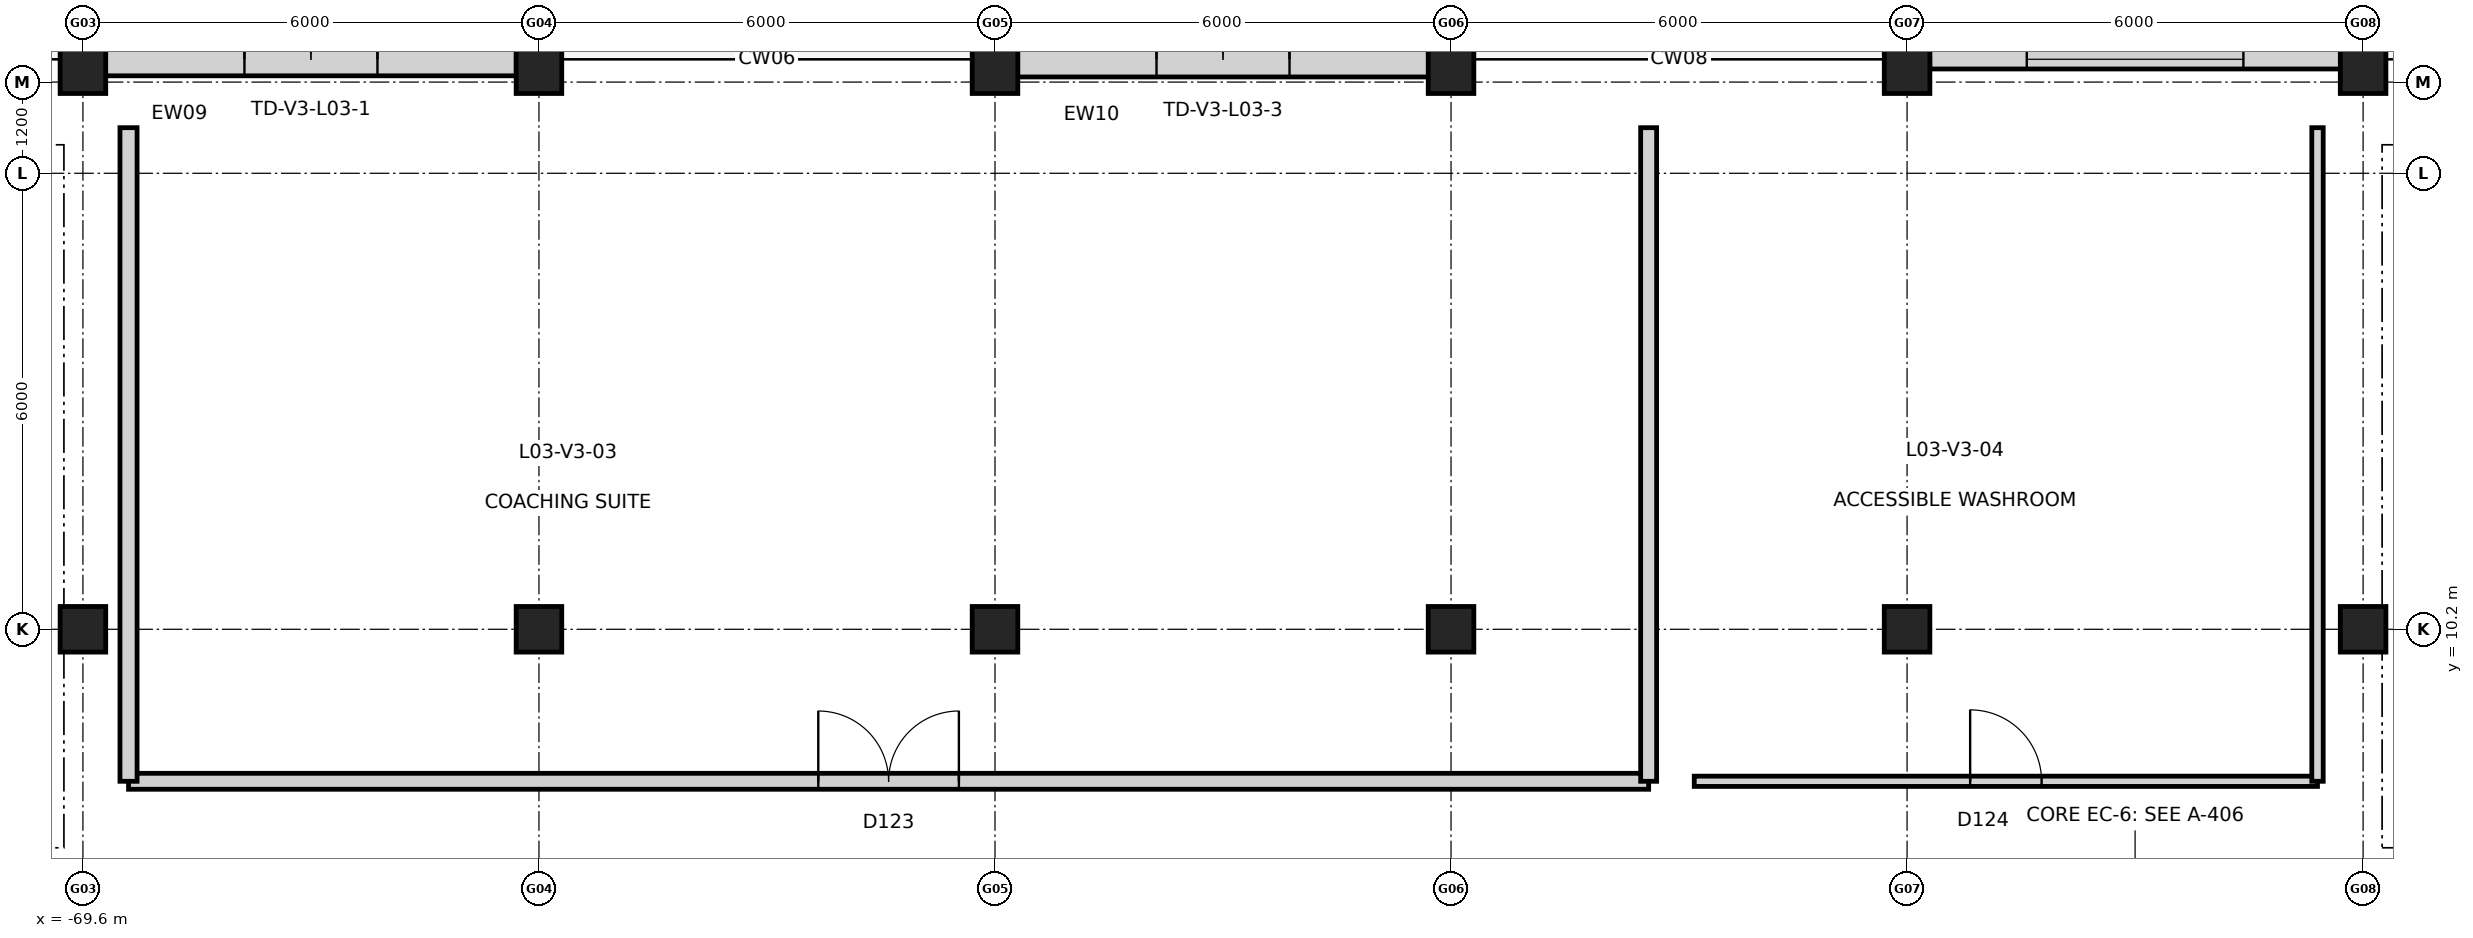
"""IFC4 building model, lengths in metres.
Left out: names, types, materials, properties, quantities, classifications, styles, units other than length and angle.
Written with IfcOpenShell. Run it as: python <this file> out.ifc"""

import sys

from ifc_helpers import new_model, si_unit, direction, frame, frame_2d, origin, origin_2d, place, context, subcontext, project, spatial, rectangle, extrude, element, fill, save


model = new_model("IFC4")
c1 = context("Model", 3, precision=1e-05, world=origin(), true_north=direction((0.0, 1.0)))
c2 = subcontext(c1, "Body", "Model", "MODEL_VIEW")
j1 = project(units=[si_unit("LENGTHUNIT", "METRE"), si_unit("PLANEANGLEUNIT", "RADIAN")], contexts=[c1])
p1 = place(None, origin())
s1 = spatial("IfcSite", under=j1, at=p1, CompositionType="ELEMENT")
p2 = place(p1, origin())
s2 = spatial("IfcBuilding", under=s1, at=p2, CompositionType="ELEMENT")
p3 = place(p2, frame((0.0, 0.0, 15.0)))
s3 = spatial("IfcBuildingStorey", under=s2, at=p3, CompositionType="ELEMENT", Elevation=15.0)
p4 = place(p3, frame((-69.6, 10.2, 0.0), z_axis=(0.0, 0.0, 1.0), x_axis=(1.0, 0.0, 0.0)))
e1 = element("IfcColumn", 1, at=p4, inside=s3, PredefinedType="COLUMN", context=c2, shape_type="SweptSolid", body=[
    extrude(rectangle(XDim=0.6, YDim=0.6, at=origin_2d()), origin(), (0.0, 0.0, 1.0), 4.8),
])
p5 = place(p3, frame((-69.6, 17.7, 0.0), z_axis=(0.0, 0.0, 1.0), x_axis=(1.0, 0.0, 0.0)))
e2 = element("IfcColumn", 2, at=p5, inside=s3, PredefinedType="COLUMN", context=c2, shape_type="SweptSolid", body=[
    extrude(rectangle(XDim=0.6, YDim=0.9, at=origin_2d()), origin(), (0.0, 0.0, 1.0), 4.8),
])
p6 = place(p3, frame((-63.6, 10.2, 0.0), z_axis=(0.0, 0.0, 1.0), x_axis=(1.0, 0.0, 0.0)))
e3 = element("IfcColumn", 3, at=p6, inside=s3, PredefinedType="COLUMN", context=c2, shape_type="SweptSolid", body=[
    extrude(rectangle(XDim=0.6, YDim=0.6, at=origin_2d()), origin(), (0.0, 0.0, 1.0), 4.8),
])
p7 = place(p3, frame((-63.6, 17.7, 0.0), z_axis=(0.0, 0.0, 1.0), x_axis=(1.0, 0.0, 0.0)))
e4 = element("IfcColumn", 4, at=p7, inside=s3, PredefinedType="COLUMN", context=c2, shape_type="SweptSolid", body=[
    extrude(rectangle(XDim=0.6, YDim=0.9, at=origin_2d()), origin(), (0.0, 0.0, 1.0), 4.8),
])
p8 = place(p3, frame((-57.6, 10.2, 0.0), z_axis=(0.0, 0.0, 1.0), x_axis=(1.0, 0.0, 0.0)))
e5 = element("IfcColumn", 5, at=p8, inside=s3, PredefinedType="COLUMN", context=c2, shape_type="SweptSolid", body=[
    extrude(rectangle(XDim=0.6, YDim=0.6, at=origin_2d()), origin(), (0.0, 0.0, 1.0), 4.8),
])
p9 = place(p3, frame((-57.6, 17.7, 0.0), z_axis=(0.0, 0.0, 1.0), x_axis=(1.0, 0.0, 0.0)))
e6 = element("IfcColumn", 6, at=p9, inside=s3, PredefinedType="COLUMN", context=c2, shape_type="SweptSolid", body=[
    extrude(rectangle(XDim=0.6, YDim=0.9, at=origin_2d()), origin(), (0.0, 0.0, 1.0), 4.8),
])
p10 = place(p3, frame((-51.6, 10.2, 0.0), z_axis=(0.0, 0.0, 1.0), x_axis=(1.0, 0.0, 0.0)))
e7 = element("IfcColumn", 7, at=p10, inside=s3, PredefinedType="COLUMN", context=c2, shape_type="SweptSolid", body=[
    extrude(rectangle(XDim=0.6, YDim=0.6, at=origin_2d()), origin(), (0.0, 0.0, 1.0), 4.8),
])
p11 = place(p3, frame((-51.6, 17.7, 0.0), z_axis=(0.0, 0.0, 1.0), x_axis=(1.0, 0.0, 0.0)))
e8 = element("IfcColumn", 8, at=p11, inside=s3, PredefinedType="COLUMN", context=c2, shape_type="SweptSolid", body=[
    extrude(rectangle(XDim=0.6, YDim=0.9, at=origin_2d()), origin(), (0.0, 0.0, 1.0), 4.8),
])
p12 = place(p3, frame((-45.6, 10.2, 0.0), z_axis=(0.0, 0.0, 1.0), x_axis=(1.0, 0.0, 0.0)))
e9 = element("IfcColumn", 9, at=p12, inside=s3, PredefinedType="COLUMN", context=c2, shape_type="SweptSolid", body=[
    extrude(rectangle(XDim=0.6, YDim=0.6, at=origin_2d()), origin(), (0.0, 0.0, 1.0), 4.8),
])
p13 = place(p3, frame((-45.6, 17.7, 0.0), z_axis=(0.0, 0.0, 1.0), x_axis=(1.0, 0.0, 0.0)))
e10 = element("IfcColumn", 10, at=p13, inside=s3, PredefinedType="COLUMN", context=c2, shape_type="SweptSolid", body=[
    extrude(rectangle(XDim=0.6, YDim=0.9, at=origin_2d()), origin(), (0.0, 0.0, 1.0), 4.8),
])
p14 = place(p3, frame((-39.6, 10.2, 0.0), z_axis=(0.0, 0.0, 1.0), x_axis=(1.0, 0.0, 0.0)))
e11 = element("IfcColumn", 11, at=p14, inside=s3, PredefinedType="COLUMN", context=c2, shape_type="SweptSolid", body=[
    extrude(rectangle(XDim=0.6, YDim=0.6, at=origin_2d()), origin(), (0.0, 0.0, 1.0), 4.8),
])
p15 = place(p3, frame((-39.6, 17.7, 0.0), z_axis=(0.0, 0.0, 1.0), x_axis=(1.0, 0.0, 0.0)))
e12 = element("IfcColumn", 12, at=p15, inside=s3, PredefinedType="COLUMN", context=c2, shape_type="SweptSolid", body=[
    extrude(rectangle(XDim=0.6, YDim=0.9, at=origin_2d()), origin(), (0.0, 0.0, 1.0), 4.8),
])
p16 = place(p3, frame((-69.302, 17.7, 0.0), z_axis=(0.0, 0.0, 1.0), x_axis=(1.0, 0.0, 0.0)))
e13 = element("IfcWall", 13, at=p16, inside=s3, PredefinedType="STANDARD", context=c2, shape_type="SweptSolid", body=[
    extrude(rectangle(XDim=5.404, YDim=0.435, at=frame_2d((2.702, 0.0))), origin(), (0.0, 0.0, 1.0), 3.745),
])
p17 = place(p16, frame((1.827, 0.0, 0.0)))
e14 = element("IfcOpeningElement", 14, at=p17, cuts=e13, PredefinedType="OPENING", context=c2, shape_type="SweptSolid", body=[
    extrude(rectangle(XDim=1.75, YDim=2.3, at=frame_2d((0.875, 1.15))), frame((0.0, 0.228, 0.0), z_axis=(0.0, -1.0, 0.0), x_axis=(1.0, 0.0, 0.0)), (0.0, 0.0, 1.0), 0.455),
])
p18 = place(p3, frame((-57.302, 17.7, 0.0), z_axis=(0.0, 0.0, 1.0), x_axis=(1.0, 0.0, 0.0)))
e15 = element("IfcWall", 15, at=p18, inside=s3, PredefinedType="STANDARD", context=c2, shape_type="SweptSolid", body=[
    extrude(rectangle(XDim=5.404, YDim=0.465, at=frame_2d((2.702, 0.0))), origin(), (0.0, 0.0, 1.0), 3.745),
])
p19 = place(p18, frame((1.827, 0.0, 0.0)))
e16 = element("IfcOpeningElement", 16, at=p19, cuts=e15, PredefinedType="OPENING", context=c2, shape_type="SweptSolid", body=[
    extrude(rectangle(XDim=1.75, YDim=2.3, at=frame_2d((0.875, 1.15))), frame((0.0, 0.242, 0.0), z_axis=(0.0, -1.0, 0.0), x_axis=(1.0, 0.0, 0.0)), (0.0, 0.0, 1.0), 0.485),
])
p20 = place(p3, frame((-45.302, 17.7, 0.0), z_axis=(0.0, 0.0, 1.0), x_axis=(1.0, 0.0, 0.0)))
e17 = element("IfcWall", 17, at=p20, inside=s3, PredefinedType="STANDARD", context=c2, shape_type="SweptSolid", body=[
    extrude(rectangle(XDim=5.404, YDim=0.255, at=frame_2d((2.702, 0.0))), origin(), (0.0, 0.0, 1.0), 3.745),
])
p21 = place(p20, frame((1.277, 0.0, 0.85)))
e18 = element("IfcOpeningElement", 18, at=p21, cuts=e17, PredefinedType="OPENING", context=c2, shape_type="SweptSolid", body=[
    extrude(rectangle(XDim=2.85, YDim=2.1, at=frame_2d((1.425, 1.05))), frame((0.0, 0.137, 0.0), z_axis=(0.0, -1.0, 0.0), x_axis=(1.0, 0.0, 0.0)), (0.0, 0.0, 1.0), 0.275),
])
p22 = place(p3, frame((-69.0, 8.2, 0.0), z_axis=(0.0, 0.0, 1.0), x_axis=(1.0, 0.0, 0.0)))
e19 = element("IfcWall", 19, at=p22, inside=s3, PredefinedType="PARTITIONING", context=c2, shape_type="SweptSolid", body=[
    extrude(rectangle(XDim=20.0, YDim=0.21, at=frame_2d((10.0, 0.0))), origin(), (0.0, 0.0, 1.0), 4.42),
])
p23 = place(p22, frame((9.075, 0.0, 0.0)))
e20 = element("IfcOpeningElement", 20, at=p23, cuts=e19, PredefinedType="OPENING", context=c2, shape_type="SweptSolid", body=[
    extrude(rectangle(XDim=1.85, YDim=2.3, at=frame_2d((0.925, 1.15))), frame((0.0, 0.115, 0.0), z_axis=(0.0, -1.0, 0.0), x_axis=(1.0, 0.0, 0.0)), (0.0, 0.0, 1.0), 0.23),
])
p24 = place(p3, frame((-69.0, 8.2, 0.0), z_axis=(0.0, 0.0, 1.0), x_axis=(0.0, 1.0, 0.0)))
e21 = element("IfcWall", 21, at=p24, inside=s3, PredefinedType="PARTITIONING", context=c2, shape_type="SweptSolid", body=[
    extrude(rectangle(XDim=8.6, YDim=0.225, at=frame_2d((4.3, 0.0))), origin(), (0.0, 0.0, 1.0), 4.42),
])
p25 = place(p3, frame((-49.0, 8.2, 0.0), z_axis=(0.0, 0.0, 1.0), x_axis=(0.0, 1.0, 0.0)))
e22 = element("IfcWall", 22, at=p25, inside=s3, PredefinedType="PARTITIONING", context=c2, shape_type="SweptSolid", body=[
    extrude(rectangle(XDim=8.6, YDim=0.21, at=frame_2d((4.3, 0.0))), origin(), (0.0, 0.0, 1.0), 4.42),
])
p26 = place(p3, frame((-48.4, 8.2, 0.0), z_axis=(0.0, 0.0, 1.0), x_axis=(1.0, 0.0, 0.0)))
e23 = element("IfcWall", 23, at=p26, inside=s3, PredefinedType="PARTITIONING", context=c2, shape_type="SweptSolid", body=[
    extrude(rectangle(XDim=8.2, YDim=0.135, at=frame_2d((4.1, 0.0))), origin(), (0.0, 0.0, 1.0), 4.42),
])
p27 = place(p26, frame((3.63, 0.0, 0.0)))
e24 = element("IfcOpeningElement", 24, at=p27, cuts=e23, PredefinedType="OPENING", context=c2, shape_type="SweptSolid", body=[
    extrude(rectangle(XDim=0.94, YDim=2.1, at=frame_2d((0.47, 1.05))), frame((0.0, 0.077, 0.0), z_axis=(0.0, -1.0, 0.0), x_axis=(1.0, 0.0, 0.0)), (0.0, 0.0, 1.0), 0.155),
])
p28 = place(p3, frame((-40.2, 8.2, 0.0), z_axis=(0.0, 0.0, 1.0), x_axis=(0.0, 1.0, 0.0)))
e25 = element("IfcWall", 25, at=p28, inside=s3, PredefinedType="PARTITIONING", context=c2, shape_type="SweptSolid", body=[
    extrude(rectangle(XDim=8.6, YDim=0.15, at=frame_2d((4.3, 0.0))), origin(), (0.0, 0.0, 1.0), 4.42),
])
p29 = place(p17, origin())
e26 = element("IfcDoor", 26, at=p29, inside=s3, OperationType="DOUBLE_DOOR_SINGLE_SWING", PredefinedType="DOOR", context=c2, shape_type="SweptSolid", body=[
    extrude(rectangle(XDim=1.75, YDim=2.3, at=frame_2d((0.875, 1.15))), frame((0.0, 0.025, 0.0), z_axis=(0.0, -1.0, 0.0), x_axis=(1.0, 0.0, 0.0)), (0.0, 0.0, 1.0), 0.05),
])
fill(e14, e26)
p30 = place(p19, origin())
e27 = element("IfcDoor", 27, at=p30, inside=s3, OperationType="DOUBLE_DOOR_SINGLE_SWING", PredefinedType="DOOR", context=c2, shape_type="SweptSolid", body=[
    extrude(rectangle(XDim=1.75, YDim=2.3, at=frame_2d((0.875, 1.15))), frame((0.0, 0.025, 0.0), z_axis=(0.0, -1.0, 0.0), x_axis=(1.0, 0.0, 0.0)), (0.0, 0.0, 1.0), 0.05),
])
fill(e16, e27)
p31 = place(p21, origin())
e28 = element("IfcWindow", 28, at=p31, inside=s3, PartitioningType="SINGLE_PANEL", PredefinedType="WINDOW", context=c2, shape_type="SweptSolid", body=[
    extrude(rectangle(XDim=2.85, YDim=2.1, at=frame_2d((1.425, 1.05))), frame((0.0, 0.03, 0.0), z_axis=(0.0, -1.0, 0.0), x_axis=(1.0, 0.0, 0.0)), (0.0, 0.0, 1.0), 0.06),
])
fill(e18, e28)
p32 = place(p23, origin())
e29 = element("IfcDoor", 29, at=p32, inside=s3, OperationType="DOUBLE_DOOR_SINGLE_SWING", PredefinedType="DOOR", context=c2, shape_type="SweptSolid", body=[
    extrude(rectangle(XDim=1.85, YDim=2.3, at=frame_2d((0.925, 1.15))), frame((0.0, 0.025, 0.0), z_axis=(0.0, -1.0, 0.0), x_axis=(1.0, 0.0, 0.0)), (0.0, 0.0, 1.0), 0.05),
])
fill(e20, e29)
p33 = place(p27, origin())
e30 = element("IfcDoor", 30, at=p33, inside=s3, OperationType="SINGLE_SWING_LEFT", PredefinedType="DOOR", context=c2, shape_type="SweptSolid", body=[
    extrude(rectangle(XDim=0.94, YDim=2.1, at=frame_2d((0.47, 1.05))), frame((0.0, 0.025, 0.0), z_axis=(0.0, -1.0, 0.0), x_axis=(1.0, 0.0, 0.0)), (0.0, 0.0, 1.0), 0.05),
])
fill(e24, e30)
save(model, sys.argv[1])
